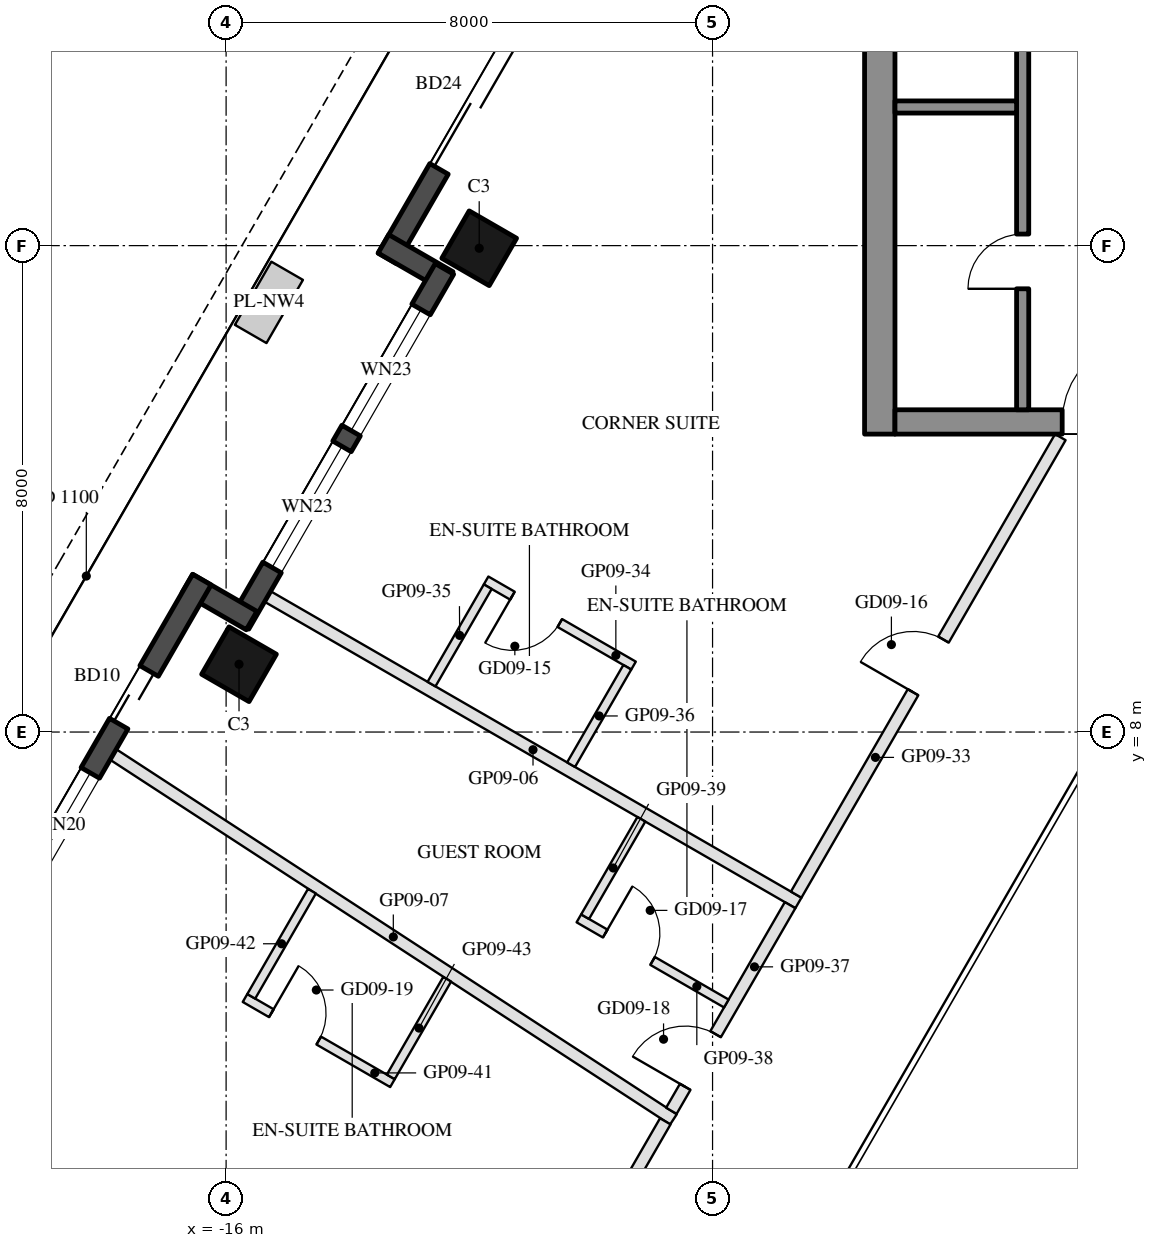
"""IFC4 building model, lengths in metres.
Left out: names, types, materials, properties, quantities, classifications, styles, units other than length and angle.
Written with IfcOpenShell. Run it as: python <this file> out.ifc"""

import sys

from ifc_helpers import new_model, si_unit, direction, frame, frame_2d, origin, origin_2d, place, context, subcontext, project, spatial, rectangle, hollow_rectangle, extrude, element, fill, save


model = new_model("IFC4")
c1 = context("Model", 3, precision=1e-05, world=origin(), true_north=direction((0.0, 1.0)))
c2 = subcontext(c1, "Body", "Model", "MODEL_VIEW")
j1 = project(units=[si_unit("LENGTHUNIT", "METRE"), si_unit("PLANEANGLEUNIT", "RADIAN")], contexts=[c1])
p1 = place(None, origin())
s1 = spatial("IfcSite", under=j1, at=p1, CompositionType="ELEMENT")
p2 = place(p1, origin())
s2 = spatial("IfcBuilding", under=s1, at=p2, CompositionType="ELEMENT")
p3 = place(p2, frame((0.0, 0.0, 113.1)))
s3 = spatial("IfcBuildingStorey", under=s2, at=p3, CompositionType="ELEMENT", Elevation=113.1)
for number, where, z_axis, x_axis in (
    (1, (-11.838, 15.957, 0.0), (0.0, 0.0, 1.0), (0.5, 0.866, 0.0)),
    (2, (-15.788, 9.115, 0.0), (0.0, 0.0, 1.0), (0.5, 0.866, 0.0)),
):
    element("IfcColumn", number, at=place(p3, frame(where, z_axis=z_axis, x_axis=x_axis)), inside=s3, PredefinedType="COLUMN", context=c2, shape_type="SweptSolid", body=[
        extrude(hollow_rectangle(XDim=0.9, YDim=0.9, WallThickness=0.04, at=origin_2d()), origin(), (0.0, 0.0, 1.0), 3.7),
    ])
p4 = place(p3, frame((-7.441, 26.022, 0.0), z_axis=(0.0, 0.0, 1.0), x_axis=(-0.499992533062, -0.86602971478, 0.0)))
e3 = element("IfcWall", 3, at=p4, inside=s3, PredefinedType="SOLIDWALL", context=c2, shape_type="SweptSolid", body=[
    extrude(rectangle(XDim=11.816, YDim=0.35, at=frame_2d((5.908, 0.0))), origin(), (0.0, 0.0, 1.0), 3.55),
])
p5 = place(p4, frame((0.381, 0.0, 0.3)))
e4 = element("IfcOpeningElement", 4, at=p5, cuts=e3, PredefinedType="OPENING", context=c2, shape_type="SweptSolid", body=[
    extrude(rectangle(XDim=1.8, YDim=2.65, at=frame_2d((0.9, 1.325))), frame((0.0, 0.185, 0.0), z_axis=(0.0, -1.0, 0.0), x_axis=(1.0, 0.0, 0.0)), (0.0, 0.0, 1.0), 0.37),
])
p6 = place(p4, frame((7.716, 0.0, 0.0)))
e5 = element("IfcOpeningElement", 5, at=p6, cuts=e3, PredefinedType="OPENING", context=c2, shape_type="SweptSolid", body=[
    extrude(rectangle(XDim=2.4, YDim=2.4, at=frame_2d((1.2, 1.2))), frame((0.0, 0.185, 0.0), z_axis=(0.0, -1.0, 0.0), x_axis=(1.0, 0.0, 0.0)), (0.0, 0.0, 1.0), 0.37),
])
p7 = place(p4, frame((3.815, 0.0, 0.3)))
e6 = element("IfcOpeningElement", 6, at=p7, cuts=e3, PredefinedType="OPENING", context=c2, shape_type="SweptSolid", body=[
    extrude(rectangle(XDim=1.6, YDim=2.65, at=frame_2d((0.8, 1.325))), frame((0.0, 0.185, 0.0), z_axis=(0.0, -1.0, 0.0), x_axis=(1.0, 0.0, 0.0)), (0.0, 0.0, 1.0), 0.37),
])
p8 = place(p4, frame((5.715, 0.0, 0.3)))
e7 = element("IfcOpeningElement", 7, at=p8, cuts=e3, PredefinedType="OPENING", context=c2, shape_type="SweptSolid", body=[
    extrude(rectangle(XDim=1.6, YDim=2.65, at=frame_2d((0.8, 1.325))), frame((0.0, 0.185, 0.0), z_axis=(0.0, -1.0, 0.0), x_axis=(1.0, 0.0, 0.0)), (0.0, 0.0, 1.0), 0.37),
])
p9 = place(p3, frame((-13.413, 16.029, 0.0), z_axis=(0.0, 0.0, 1.0), x_axis=(0.866005645448, -0.500034220881, 0.0)))
e8 = element("IfcWall", 8, at=p9, inside=s3, PredefinedType="SOLIDWALL", context=c2, shape_type="SweptSolid", body=[
    extrude(rectangle(XDim=1.22, YDim=0.35, at=frame_2d((0.61, 0.0))), origin(), (0.0, 0.0, 1.0), 3.55),
])
p10 = place(p3, frame((-12.409, 15.617, 0.0), z_axis=(0.0, 0.0, 1.0), x_axis=(-0.500003597184, -0.866023326939, 0.0)))
e9 = element("IfcWall", 9, at=p10, inside=s3, PredefinedType="SOLIDWALL", context=c2, shape_type="SweptSolid", body=[
    extrude(rectangle(XDim=6.74, YDim=0.35, at=frame_2d((3.37, 0.0))), origin(), (0.0, 0.0, 1.0), 3.55),
])
p11 = place(p10, frame((0.77, 0.0, 0.3)))
e10 = element("IfcOpeningElement", 10, at=p11, cuts=e9, PredefinedType="OPENING", context=c2, shape_type="SweptSolid", body=[
    extrude(rectangle(XDim=2.3, YDim=2.65, at=frame_2d((1.15, 1.325))), frame((0.0, 0.185, 0.0), z_axis=(0.0, -1.0, 0.0), x_axis=(1.0, 0.0, 0.0)), (0.0, 0.0, 1.0), 0.37),
])
p12 = place(p10, frame((3.37, 0.0, 0.3)))
e11 = element("IfcOpeningElement", 11, at=p12, cuts=e9, PredefinedType="OPENING", context=c2, shape_type="SweptSolid", body=[
    extrude(rectangle(XDim=2.3, YDim=2.65, at=frame_2d((1.15, 1.325))), frame((0.0, 0.185, 0.0), z_axis=(0.0, -1.0, 0.0), x_axis=(1.0, 0.0, 0.0)), (0.0, 0.0, 1.0), 0.37),
])
p13 = place(p3, frame((-15.581, 9.833, 0.0), z_axis=(0.0, 0.0, 1.0), x_axis=(-0.866055662726, 0.499947586314, 0.0)))
e12 = element("IfcWall", 12, at=p13, inside=s3, PredefinedType="SOLIDWALL", context=c2, shape_type="SweptSolid", body=[
    extrude(rectangle(XDim=1.22, YDim=0.35, at=frame_2d((0.61, 0.0))), origin(), (0.0, 0.0, 1.0), 3.55),
])
p14 = place(p3, frame((-16.398, 10.507, 0.0), z_axis=(0.0, 0.0, 1.0), x_axis=(-0.499999142773, -0.866025898704, 0.0)))
e13 = element("IfcWall", 13, at=p14, inside=s3, PredefinedType="SOLIDWALL", context=c2, shape_type="SweptSolid", body=[
    extrude(rectangle(XDim=9.7, YDim=0.35, at=frame_2d((4.85, 0.0))), origin(), (0.0, 0.0, 1.0), 3.55),
])
p15 = place(p14, frame((1.735, 0.0, 0.0)))
e14 = element("IfcOpeningElement", 14, at=p15, cuts=e13, PredefinedType="OPENING", context=c2, shape_type="SweptSolid", body=[
    extrude(rectangle(XDim=1.0, YDim=2.4, at=frame_2d((0.5, 1.2))), frame((0.0, 0.185, 0.0), z_axis=(0.0, -1.0, 0.0), x_axis=(1.0, 0.0, 0.0)), (0.0, 0.0, 1.0), 0.37),
])
p16 = place(p14, frame((3.67, 0.0, 0.3)))
e15 = element("IfcOpeningElement", 15, at=p16, cuts=e13, PredefinedType="OPENING", context=c2, shape_type="SweptSolid", body=[
    extrude(rectangle(XDim=2.0, YDim=2.65, at=frame_2d((1.0, 1.325))), frame((0.0, 0.185, 0.0), z_axis=(0.0, -1.0, 0.0), x_axis=(1.0, 0.0, 0.0)), (0.0, 0.0, 1.0), 0.37),
])
p17 = place(p14, frame((5.97, 0.0, 0.3)))
e16 = element("IfcOpeningElement", 16, at=p17, cuts=e13, PredefinedType="OPENING", context=c2, shape_type="SweptSolid", body=[
    extrude(rectangle(XDim=2.0, YDim=2.65, at=frame_2d((1.0, 1.325))), frame((0.0, 0.185, 0.0), z_axis=(0.0, -1.0, 0.0), x_axis=(1.0, 0.0, 0.0)), (0.0, 0.0, 1.0), 0.37),
])
p18 = place(p3, frame((-5.25, 12.9, 0.0), z_axis=(0.0, 0.0, 1.0), x_axis=(0.0, 1.0, 0.0)))
e17 = element("IfcWall", 17, at=p18, inside=s3, PredefinedType="SHEAR", context=c2, shape_type="SweptSolid", body=[
    extrude(rectangle(XDim=14.837, YDim=0.5, at=frame_2d((7.418, 0.0))), origin(), (0.0, 0.0, 1.0), 3.5),
])
p19 = place(p3, frame((5.0, 13.1, 0.0), z_axis=(0.0, 0.0, 1.0), x_axis=(-1.0, 0.0, 0.0)))
e18 = element("IfcWall", 18, at=p19, inside=s3, PredefinedType="SHEAR", context=c2, shape_type="SweptSolid", body=[
    extrude(rectangle(XDim=10.0, YDim=0.4, at=frame_2d((5.0, 0.0))), origin(), (0.0, 0.0, 1.0), 3.5),
])
p20 = place(p19, frame((3.55, 0.0, 0.0)))
e19 = element("IfcOpeningElement", 19, at=p20, cuts=e18, PredefinedType="OPENING", context=c2, shape_type="SweptSolid", body=[
    extrude(rectangle(XDim=1.1, YDim=2.1, at=frame_2d((0.55, 1.05))), frame((0.0, 0.21, 0.0), z_axis=(0.0, -1.0, 0.0), x_axis=(1.0, 0.0, 0.0)), (0.0, 0.0, 1.0), 0.42),
])
p21 = place(p19, frame((5.85, 0.0, 0.0)))
e20 = element("IfcOpeningElement", 20, at=p21, cuts=e18, PredefinedType="OPENING", context=c2, shape_type="SweptSolid", body=[
    extrude(rectangle(XDim=1.4, YDim=2.1, at=frame_2d((0.7, 1.05))), frame((0.0, 0.21, 0.0), z_axis=(0.0, -1.0, 0.0), x_axis=(1.0, 0.0, 0.0)), (0.0, 0.0, 1.0), 0.42),
])
p22 = place(p3, frame((-2.9, 13.3, 0.0), z_axis=(0.0, 0.0, 1.0), x_axis=(0.0, 1.0, 0.0)))
e21 = element("IfcWall", 21, at=p22, inside=s3, PredefinedType="SHEAR", context=c2, shape_type="SweptSolid", body=[
    extrude(rectangle(XDim=12.6, YDim=0.2, at=frame_2d((6.3, 0.0))), origin(), (0.0, 0.0, 1.0), 3.5),
])
p23 = place(p22, frame((1.99, 0.0, 0.0)))
e22 = element("IfcOpeningElement", 22, at=p23, cuts=e21, PredefinedType="OPENING", context=c2, shape_type="SweptSolid", body=[
    extrude(rectangle(XDim=0.9, YDim=2.1, at=frame_2d((0.45, 1.05))), frame((0.0, 0.11, 0.0), z_axis=(0.0, -1.0, 0.0), x_axis=(1.0, 0.0, 0.0)), (0.0, 0.0, 1.0), 0.22),
])
p24 = place(p22, frame((7.07, 0.0, 0.0)))
e23 = element("IfcOpeningElement", 23, at=p24, cuts=e21, PredefinedType="OPENING", context=c2, shape_type="SweptSolid", body=[
    extrude(rectangle(XDim=0.9, YDim=2.1, at=frame_2d((0.45, 1.05))), frame((0.0, 0.11, 0.0), z_axis=(0.0, -1.0, 0.0), x_axis=(1.0, 0.0, 0.0)), (0.0, 0.0, 1.0), 0.22),
])
p25 = place(p22, frame((10.51, 0.0, 0.0)))
e24 = element("IfcOpeningElement", 24, at=p25, cuts=e21, PredefinedType="OPENING", context=c2, shape_type="SweptSolid", body=[
    extrude(rectangle(XDim=0.9, YDim=2.1, at=frame_2d((0.45, 1.05))), frame((0.0, 0.11, 0.0), z_axis=(0.0, -1.0, 0.0), x_axis=(1.0, 0.0, 0.0)), (0.0, 0.0, 1.0), 0.22),
])
p26 = place(p3, frame((-3.0, 18.28, 0.0), z_axis=(0.0, 0.0, 1.0), x_axis=(-1.0, 0.0, 0.0)))
e25 = element("IfcWall", 25, at=p26, inside=s3, PredefinedType="SHEAR", context=c2, shape_type="SweptSolid", body=[
    extrude(rectangle(XDim=2.0, YDim=0.2, at=frame_2d((1.0, 0.0))), origin(), (0.0, 0.0, 1.0), 3.5),
])
p27 = place(p3, frame((-15.317, 10.229, 0.0), z_axis=(0.0, 0.0, 1.0), x_axis=(0.866022637375, -0.500004791531, 0.0)))
e26 = element("IfcWall", 26, at=p27, inside=s3, PredefinedType="PARTITIONING", context=c2, shape_type="SweptSolid", body=[
    extrude(rectangle(XDim=10.08, YDim=0.2, at=frame_2d((5.04, 0.0))), origin(), (0.0, 0.0, 1.0), 2.96),
])
p28 = place(p3, frame((-17.857, 7.631, 0.0), z_axis=(0.0, 0.0, 1.0), x_axis=(0.837909060234, -0.545809863211, 0.0)))
e27 = element("IfcWall", 27, at=p28, inside=s3, PredefinedType="PARTITIONING", context=c2, shape_type="SweptSolid", body=[
    extrude(rectangle(XDim=10.996, YDim=0.2, at=frame_2d((5.498, 0.0))), origin(), (0.0, 0.0, 1.0), 2.96),
])
p29 = place(p3, frame((-6.625, 5.326, 0.0), z_axis=(0.0, 0.0, 1.0), x_axis=(0.499980288617, 0.866036783858, 0.0)))
e28 = element("IfcWall", 28, at=p29, inside=s3, PredefinedType="PARTITIONING", context=c2, shape_type="SweptSolid", body=[
    extrude(rectangle(XDim=8.688, YDim=0.2, at=frame_2d((4.344, 0.0))), origin(), (0.0, 0.0, 1.0), 2.95),
])
p30 = place(p29, frame((3.844, 0.0, 0.0)))
e29 = element("IfcOpeningElement", 29, at=p30, cuts=e28, PredefinedType="OPENING", context=c2, shape_type="SweptSolid", body=[
    extrude(rectangle(XDim=1.0, YDim=2.1, at=frame_2d((0.5, 1.05))), frame((0.0, 0.11, 0.0), z_axis=(0.0, -1.0, 0.0), x_axis=(1.0, 0.0, 0.0)), (0.0, 0.0, 1.0), 0.22),
])
p31 = place(p3, frame((-9.299, 9.093, 0.0), z_axis=(0.0, 0.0, 1.0), x_axis=(-0.866056369097, 0.49994636267, 0.0)))
e30 = element("IfcWall", 30, at=p31, inside=s3, PredefinedType="PARTITIONING", context=c2, shape_type="SweptSolid", body=[
    extrude(rectangle(XDim=2.8, YDim=0.15, at=frame_2d((1.4, 0.0))), origin(), (0.0, 0.0, 1.0), 3.55),
])
p32 = place(p31, frame((1.4, 0.0, 0.0)))
e31 = element("IfcOpeningElement", 31, at=p32, cuts=e30, PredefinedType="OPENING", context=c2, shape_type="SweptSolid", body=[
    extrude(rectangle(XDim=0.9, YDim=2.1, at=frame_2d((0.45, 1.05))), frame((0.0, 0.085, 0.0), z_axis=(0.0, -1.0, 0.0), x_axis=(1.0, 0.0, 0.0)), (0.0, 0.0, 1.0), 0.17),
])
for number, where, z_axis, x_axis in (
    (32, (-11.697, 10.39, 0.0), (0.0, 0.0, 1.0), (-0.5, -0.866, 0.0)),
    (33, (-9.402, 9.065, 0.0), (0.0, 0.0, 1.0), (-0.5, -0.866, 0.0)),
):
    element("IfcWall", number, at=place(p3, frame(where, z_axis=z_axis, x_axis=x_axis)), inside=s3, PredefinedType="PARTITIONING", context=c2, shape_type="SweptSolid", body=[
        extrude(rectangle(XDim=1.85, YDim=0.15, at=frame_2d((0.925, 0.0))), origin(), (0.0, 0.0, 1.0), 3.55),
    ])
p33 = place(p3, frame((-8.677, 1.771, 0.0), z_axis=(0.0, 0.0, 1.0), x_axis=(0.499998439657, 0.866026304647, 0.0)))
e34 = element("IfcWall", 34, at=p33, inside=s3, PredefinedType="PARTITIONING", context=c2, shape_type="SweptSolid", body=[
    extrude(rectangle(XDim=3.905, YDim=0.2, at=frame_2d((1.953, 0.0))), origin(), (0.0, 0.0, 1.0), 2.95),
])
p34 = place(p33, frame((0.455, 0.0, 0.0)))
e35 = element("IfcOpeningElement", 35, at=p34, cuts=e34, PredefinedType="OPENING", context=c2, shape_type="SweptSolid", body=[
    extrude(rectangle(XDim=1.0, YDim=2.1, at=frame_2d((0.5, 1.05))), frame((0.0, 0.11, 0.0), z_axis=(0.0, -1.0, 0.0), x_axis=(1.0, 0.0, 0.0)), (0.0, 0.0, 1.0), 0.22),
])
p35 = place(p3, frame((-10.198, 4.936, 0.0), z_axis=(0.0, 0.0, 1.0), x_axis=(0.865996816683, -0.500049511043, 0.0)))
e36 = element("IfcWall", 36, at=p35, inside=s3, PredefinedType="PARTITIONING", context=c2, shape_type="SweptSolid", body=[
    extrude(rectangle(XDim=2.8, YDim=0.15, at=frame_2d((1.4, 0.0))), origin(), (0.0, 0.0, 1.0), 3.55),
])
p36 = place(p35, frame((0.5, 0.0, 0.0)))
e37 = element("IfcOpeningElement", 37, at=p36, cuts=e36, PredefinedType="OPENING", context=c2, shape_type="SweptSolid", body=[
    extrude(rectangle(XDim=0.9, YDim=2.1, at=frame_2d((0.45, 1.05))), frame((0.0, 0.085, 0.0), z_axis=(0.0, -1.0, 0.0), x_axis=(1.0, 0.0, 0.0)), (0.0, 0.0, 1.0), 0.17),
])
p37 = place(p3, frame((-9.171, 6.565, 0.0), z_axis=(0.0, 0.0, 1.0), x_axis=(-0.499985172903, -0.866033964044, 0.0)))
e38 = element("IfcWall", 38, at=p37, inside=s3, PredefinedType="PARTITIONING", context=c2, shape_type="SweptSolid", body=[
    extrude(rectangle(XDim=1.85, YDim=0.15, at=frame_2d((0.925, 0.0))), origin(), (0.0, 0.0, 1.0), 2.95),
])
p38 = place(p3, frame((-12.269, -4.45, 0.0), z_axis=(0.0, 0.0, 1.0), x_axis=(0.500016026819, 0.866016150498, 0.0)))
e39 = element("IfcWall", 39, at=p38, inside=s3, PredefinedType="PARTITIONING", context=c2, shape_type="SweptSolid", body=[
    extrude(rectangle(XDim=6.983, YDim=0.2, at=frame_2d((3.491, 0.0))), origin(), (0.0, 0.0, 1.0), 2.95),
])
p39 = place(p38, frame((2.991, 0.0, 0.0)))
e40 = element("IfcOpeningElement", 40, at=p39, cuts=e39, PredefinedType="OPENING", context=c2, shape_type="SweptSolid", body=[
    extrude(rectangle(XDim=1.0, YDim=2.1, at=frame_2d((0.5, 1.05))), frame((0.0, 0.11, 0.0), z_axis=(0.0, -1.0, 0.0), x_axis=(1.0, 0.0, 0.0)), (0.0, 0.0, 1.0), 0.22),
])
p40 = place(p3, frame((-15.689, 3.626, 0.0), z_axis=(0.0, 0.0, 1.0), x_axis=(0.866018616679, -0.500011755427, 0.0)))
e41 = element("IfcWall", 41, at=p40, inside=s3, PredefinedType="PARTITIONING", context=c2, shape_type="SweptSolid", body=[
    extrude(rectangle(XDim=2.8, YDim=0.15, at=frame_2d((1.4, 0.0))), origin(), (0.0, 0.0, 1.0), 3.55),
])
p41 = place(p40, frame((0.5, 0.0, 0.0)))
e42 = element("IfcOpeningElement", 42, at=p41, cuts=e41, PredefinedType="OPENING", context=c2, shape_type="SweptSolid", body=[
    extrude(rectangle(XDim=0.9, YDim=2.1, at=frame_2d((0.45, 1.05))), frame((0.0, 0.085, 0.0), z_axis=(0.0, -1.0, 0.0), x_axis=(1.0, 0.0, 0.0)), (0.0, 0.0, 1.0), 0.17),
])
p42 = place(p3, frame((-14.588, 5.382, 0.0), z_axis=(0.0, 0.0, 1.0), x_axis=(-0.500018837128, -0.86601452789, 0.0)))
e43 = element("IfcWall", 43, at=p42, inside=s3, PredefinedType="PARTITIONING", context=c2, shape_type="SweptSolid", body=[
    extrude(rectangle(XDim=1.997, YDim=0.15, at=frame_2d((0.998, 0.0))), origin(), (0.0, 0.0, 1.0), 2.95),
])
p43 = place(p3, frame((-12.365, 3.934, 0.0), z_axis=(0.0, 0.0, 1.0), x_axis=(-0.4999770169, -0.866038672677, 0.0)))
e44 = element("IfcWall", 44, at=p43, inside=s3, PredefinedType="PARTITIONING", context=c2, shape_type="SweptSolid", body=[
    extrude(rectangle(XDim=1.854, YDim=0.15, at=frame_2d((0.927, 0.0))), origin(), (0.0, 0.0, 1.0), 2.95),
])
p44 = place(p6, frame((2.4, 0.0, 0.0), z_axis=(0.0, 0.0, 1.0), x_axis=(-1.0, 0.0, 0.0)))
e45 = element("IfcDoor", 45, at=p44, inside=s3, OperationType="SLIDING_TO_LEFT", PredefinedType="DOOR", context=c2, shape_type="SweptSolid", body=[
    extrude(rectangle(XDim=2.4, YDim=2.4, at=frame_2d((1.2, 1.2))), frame((0.0, 0.025, 0.0), z_axis=(0.0, -1.0, 0.0), x_axis=(1.0, 0.0, 0.0)), (0.0, 0.0, 1.0), 0.05),
])
fill(e5, e45)
p45 = place(p11, origin())
e46 = element("IfcWindow", 46, at=p45, inside=s3, PartitioningType="SINGLE_PANEL", PredefinedType="WINDOW", context=c2, shape_type="SweptSolid", body=[
    extrude(rectangle(XDim=2.3, YDim=2.65, at=frame_2d((1.15, 1.325))), frame((0.0, 0.03, 0.0), z_axis=(0.0, -1.0, 0.0), x_axis=(1.0, 0.0, 0.0)), (0.0, 0.0, 1.0), 0.06),
])
fill(e10, e46)
p46 = place(p12, origin())
e47 = element("IfcWindow", 47, at=p46, inside=s3, PartitioningType="SINGLE_PANEL", PredefinedType="WINDOW", context=c2, shape_type="SweptSolid", body=[
    extrude(rectangle(XDim=2.3, YDim=2.65, at=frame_2d((1.15, 1.325))), frame((0.0, 0.03, 0.0), z_axis=(0.0, -1.0, 0.0), x_axis=(1.0, 0.0, 0.0)), (0.0, 0.0, 1.0), 0.06),
])
fill(e11, e47)
p47 = place(p15, frame((1.0, 0.0, 0.0), z_axis=(0.0, 0.0, 1.0), x_axis=(-1.0, 0.0, 0.0)))
e48 = element("IfcDoor", 48, at=p47, inside=s3, OperationType="SLIDING_TO_LEFT", PredefinedType="DOOR", context=c2, shape_type="SweptSolid", body=[
    extrude(rectangle(XDim=1.0, YDim=2.4, at=frame_2d((0.5, 1.2))), frame((0.0, 0.025, 0.0), z_axis=(0.0, -1.0, 0.0), x_axis=(1.0, 0.0, 0.0)), (0.0, 0.0, 1.0), 0.05),
])
fill(e14, e48)
p48 = place(p16, origin())
e49 = element("IfcWindow", 49, at=p48, inside=s3, PartitioningType="SINGLE_PANEL", PredefinedType="WINDOW", context=c2, shape_type="SweptSolid", body=[
    extrude(rectangle(XDim=2.0, YDim=2.65, at=frame_2d((1.0, 1.325))), frame((0.0, 0.03, 0.0), z_axis=(0.0, -1.0, 0.0), x_axis=(1.0, 0.0, 0.0)), (0.0, 0.0, 1.0), 0.06),
])
fill(e15, e49)
p49 = place(p23, origin())
e50 = element("IfcDoor", 50, at=p49, inside=s3, OperationType="SINGLE_SWING_LEFT", PredefinedType="DOOR", context=c2, shape_type="SweptSolid", body=[
    extrude(rectangle(XDim=0.9, YDim=2.1, at=frame_2d((0.45, 1.05))), frame((0.0, 0.025, 0.0), z_axis=(0.0, -1.0, 0.0), x_axis=(1.0, 0.0, 0.0)), (0.0, 0.0, 1.0), 0.05),
])
fill(e22, e50)
p50 = place(p21, frame((1.4, 0.0, 0.0), z_axis=(0.0, 0.0, 1.0), x_axis=(-1.0, 0.0, 0.0)))
e51 = element("IfcDoor", 51, at=p50, inside=s3, OperationType="DOUBLE_DOOR_SINGLE_SWING", PredefinedType="DOOR", context=c2, shape_type="SweptSolid", body=[
    extrude(rectangle(XDim=1.4, YDim=2.1, at=frame_2d((0.7, 1.05))), frame((0.0, 0.025, 0.0), z_axis=(0.0, -1.0, 0.0), x_axis=(1.0, 0.0, 0.0)), (0.0, 0.0, 1.0), 0.05),
])
fill(e20, e51)
p51 = place(p32, origin())
e52 = element("IfcDoor", 52, at=p51, inside=s3, OperationType="SINGLE_SWING_RIGHT", PredefinedType="DOOR", context=c2, shape_type="SweptSolid", body=[
    extrude(rectangle(XDim=0.9, YDim=2.1, at=frame_2d((0.45, 1.05))), frame((0.0, 0.025, 0.0), z_axis=(0.0, -1.0, 0.0), x_axis=(1.0, 0.0, 0.0)), (0.0, 0.0, 1.0), 0.05),
])
fill(e31, e52)
p52 = place(p30, origin())
e53 = element("IfcDoor", 53, at=p52, inside=s3, OperationType="SINGLE_SWING_LEFT", PredefinedType="DOOR", context=c2, shape_type="SweptSolid", body=[
    extrude(rectangle(XDim=1.0, YDim=2.1, at=frame_2d((0.5, 1.05))), frame((0.0, 0.025, 0.0), z_axis=(0.0, -1.0, 0.0), x_axis=(1.0, 0.0, 0.0)), (0.0, 0.0, 1.0), 0.05),
])
fill(e29, e53)
p53 = place(p36, origin())
e54 = element("IfcDoor", 54, at=p53, inside=s3, OperationType="SINGLE_SWING_LEFT", PredefinedType="DOOR", context=c2, shape_type="SweptSolid", body=[
    extrude(rectangle(XDim=0.9, YDim=2.1, at=frame_2d((0.45, 1.05))), frame((0.0, 0.025, 0.0), z_axis=(0.0, -1.0, 0.0), x_axis=(1.0, 0.0, 0.0)), (0.0, 0.0, 1.0), 0.05),
])
fill(e37, e54)
p54 = place(p34, origin())
e55 = element("IfcDoor", 55, at=p54, inside=s3, OperationType="SINGLE_SWING_LEFT", PredefinedType="DOOR", context=c2, shape_type="SweptSolid", body=[
    extrude(rectangle(XDim=1.0, YDim=2.1, at=frame_2d((0.5, 1.05))), frame((0.0, 0.025, 0.0), z_axis=(0.0, -1.0, 0.0), x_axis=(1.0, 0.0, 0.0)), (0.0, 0.0, 1.0), 0.05),
])
fill(e35, e55)
p55 = place(p41, origin())
e56 = element("IfcDoor", 56, at=p55, inside=s3, OperationType="SINGLE_SWING_LEFT", PredefinedType="DOOR", context=c2, shape_type="SweptSolid", body=[
    extrude(rectangle(XDim=0.9, YDim=2.1, at=frame_2d((0.45, 1.05))), frame((0.0, 0.025, 0.0), z_axis=(0.0, -1.0, 0.0), x_axis=(1.0, 0.0, 0.0)), (0.0, 0.0, 1.0), 0.05),
])
fill(e42, e56)
save(model, sys.argv[1])
